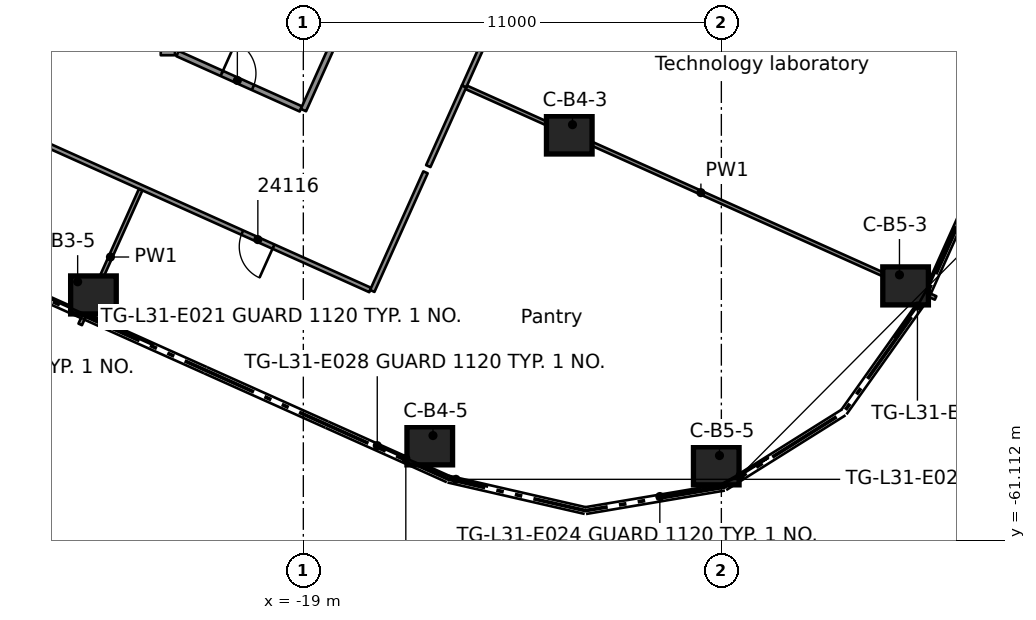
"""IFC4 building model, lengths in metres.
Left out: names, types, materials, properties, quantities, classifications, styles, units other than length and angle.
Written with IfcOpenShell. Run it as: python <this file> out.ifc"""

import sys

from ifc_helpers import new_model, si_unit, direction, frame, frame_2d, origin, origin_2d, place, context, subcontext, project, spatial, rectangle, extrude, element, fill, save


model = new_model("IFC4")
c1 = context("Model", 3, precision=1e-05, world=origin(), true_north=direction((0.0, 1.0)))
c2 = subcontext(c1, "Body", "Model", "MODEL_VIEW")
j1 = project(units=[si_unit("LENGTHUNIT", "METRE"), si_unit("PLANEANGLEUNIT", "RADIAN")], contexts=[c1])
p1 = place(None, origin())
s1 = spatial("IfcSite", under=j1, at=p1, CompositionType="ELEMENT")
p2 = place(p1, origin())
s2 = spatial("IfcBuilding", under=s1, at=p2, CompositionType="ELEMENT")
p3 = place(p2, frame((0.0, 0.0, 123.7)))
s3 = spatial("IfcBuildingStorey", under=s2, at=p3, CompositionType="ELEMENT", Elevation=123.7)
for number, where, z_axis, x_axis in (
    (1, (-24.523, -54.65, 0.0), (0.0, 0.0, 1.0), (1.0, 0.0, 0.0)),
    (2, (-12.002, -50.441, 0.0), (0.0, 0.0, 1.0), (1.0, 0.0, 0.0)),
    (3, (-15.673, -58.621, 0.0), (0.0, 0.0, 1.0), (1.0, 0.0, 0.0)),
    (4, (-3.152, -54.412, 0.0), (0.0, 0.0, 1.0), (1.0, 0.0, 0.0)),
    (5, (-8.134, -59.147, 0.0), (0.0, 0.0, 1.0), (1.0, 0.0, 0.0)),
):
    element("IfcColumn", number, at=place(p3, frame(where, z_axis=z_axis, x_axis=x_axis)), inside=s3, PredefinedType="COLUMN", context=c2, shape_type="SweptSolid", body=[
        extrude(rectangle(XDim=1.2, YDim=1.0, at=origin_2d()), origin(), (0.0, 0.0, 1.0), 3.5),
    ])
p4 = place(p3, frame((-17.239, -54.521, 0.0), z_axis=(0.0, 0.0, 1.0), x_axis=(-0.912380528424, 0.409343097355, 0.0)))
e6 = element("IfcWall", 6, at=p4, inside=s3, PredefinedType="PARTITIONING", context=c2, shape_type="SweptSolid", body=[
    extrude(rectangle(XDim=13.18, YDim=0.125, at=frame_2d((6.59, 0.0))), origin(), (0.0, 0.0, 1.0), 3.08),
])
p5 = place(p4, frame((2.792, 0.0, 0.0)))
e7 = element("IfcOpeningElement", 7, at=p5, cuts=e6, PredefinedType="OPENING", context=c2, shape_type="SweptSolid", body=[
    extrude(rectangle(XDim=0.9, YDim=2.1, at=frame_2d((0.45, 1.05))), frame((0.0, 0.073, 0.0), z_axis=(0.0, -1.0, 0.0), x_axis=(1.0, 0.0, 0.0)), (0.0, 0.0, 1.0), 0.145),
])
p6 = place(p3, frame((-22.31, -48.3, 0.0), z_axis=(0.0, 0.0, 1.0), x_axis=(0.912496069824, -0.409085470966, 0.0)))
e8 = element("IfcWall", 8, at=p6, inside=s3, PredefinedType="PARTITIONING", context=c2, shape_type="SweptSolid", body=[
    extrude(rectangle(XDim=3.556, YDim=0.15, at=frame_2d((1.778, 0.0))), origin(), (0.0, 0.0, 1.0), 3.08),
])
p7 = place(p6, frame((1.275, 0.0, 0.0)))
e9 = element("IfcOpeningElement", 9, at=p7, cuts=e8, PredefinedType="OPENING", context=c2, shape_type="SweptSolid", body=[
    extrude(rectangle(XDim=0.9, YDim=2.1, at=frame_2d((0.45, 1.05))), frame((0.0, 0.085, 0.0), z_axis=(0.0, -1.0, 0.0), x_axis=(1.0, 0.0, 0.0)), (0.0, 0.0, 1.0), 0.17),
])
p8 = place(p3, frame((-14.713, -49.188, 0.0), z_axis=(0.0, 0.0, 1.0), x_axis=(0.912374858899, -0.409355733865, 0.0)))
e10 = element("IfcWall", 10, at=p8, inside=s3, PredefinedType="PARTITIONING", context=c2, shape_type="SweptSolid", body=[
    extrude(rectangle(XDim=13.536, YDim=0.1, at=frame_2d((6.768, 0.0))), origin(), (0.0, 0.0, 1.0), 3.08),
])
p9 = place(p3, frame((-22.752, -48.268, 0.0), z_axis=(0.0, 0.0, 1.0), x_axis=(1.0, 0.0, 0.0)))
e11 = element("IfcWall", 11, at=p9, inside=s3, PredefinedType="PARTITIONING", context=c2, shape_type="SweptSolid", body=[
    extrude(rectangle(XDim=0.374, YDim=0.15, at=frame_2d((0.187, 0.0))), origin(), (0.0, 0.0, 1.0), 3.08),
])
p10 = place(p3, frame((-15.712, -51.26, 0.0), z_axis=(0.0, 0.0, 1.0), x_axis=(0.409583190249, 0.912272771854, 0.0)))
e12 = element("IfcWall", 12, at=p10, inside=s3, PredefinedType="PARTITIONING", context=c2, shape_type="SweptSolid", body=[
    extrude(rectangle(XDim=2.3, YDim=0.125, at=frame_2d((1.15, 0.0))), origin(), (0.0, 0.0, 1.0), 3.08),
])
p11 = place(p3, frame((-17.186, -54.545, 0.0), z_axis=(0.0, 0.0, 1.0), x_axis=(0.409572220998, 0.91227769664, 0.0)))
e13 = element("IfcWall", 13, at=p11, inside=s3, PredefinedType="PARTITIONING", context=c2, shape_type="SweptSolid", body=[
    extrude(rectangle(XDim=3.421, YDim=0.125, at=frame_2d((1.71, 0.0))), origin(), (0.0, 0.0, 1.0), 3.08),
])
p12 = place(p3, frame((-6.789, -31.374, 0.0), z_axis=(0.0, 0.0, 1.0), x_axis=(-0.409354309939, -0.912375497772, 0.0)))
e14 = element("IfcWall", 14, at=p12, inside=s3, PredefinedType="PARTITIONING", context=c2, shape_type="SweptSolid", body=[
    extrude(rectangle(XDim=19.496, YDim=0.125, at=frame_2d((9.748, 0.0))), origin(), (0.0, 0.0, 1.0), 3.08),
])
p13 = place(p12, frame((4.639, 0.0, 0.0)))
e15 = element("IfcOpeningElement", 15, at=p13, cuts=e14, PredefinedType="OPENING", context=c2, shape_type="SweptSolid", body=[
    extrude(rectangle(XDim=1.8, YDim=2.1, at=frame_2d((0.9, 1.05))), frame((0.0, 0.073, 0.0), z_axis=(0.0, -1.0, 0.0), x_axis=(1.0, 0.0, 0.0)), (0.0, 0.0, 1.0), 0.145),
])
p14 = place(p12, frame((14.697, 0.0, 0.0)))
e16 = element("IfcOpeningElement", 16, at=p14, cuts=e14, PredefinedType="OPENING", context=c2, shape_type="SweptSolid", body=[
    extrude(rectangle(XDim=0.9, YDim=2.1, at=frame_2d((0.45, 1.05))), frame((0.0, 0.073, 0.0), z_axis=(0.0, -1.0, 0.0), x_axis=(1.0, 0.0, 0.0)), (0.0, 0.0, 1.0), 0.145),
])
p15 = place(p3, frame((-18.997, -49.786, 0.0), z_axis=(0.0, 0.0, 1.0), x_axis=(0.409621859923, 0.912255409342, 0.0)))
e17 = element("IfcWall", 17, at=p15, inside=s3, PredefinedType="PARTITIONING", context=c2, shape_type="SweptSolid", body=[
    extrude(rectangle(XDim=21.091, YDim=0.15, at=frame_2d((10.545, 0.0))), origin(), (0.0, 0.0, 1.0), 3.08),
])
p16 = place(p15, frame((15.8, 0.0, 0.0)))
e18 = element("IfcOpeningElement", 18, at=p16, cuts=e17, PredefinedType="OPENING", context=c2, shape_type="SweptSolid", body=[
    extrude(rectangle(XDim=0.9, YDim=2.1, at=frame_2d((0.45, 1.05))), frame((0.0, 0.085, 0.0), z_axis=(0.0, -1.0, 0.0), x_axis=(1.0, 0.0, 0.0)), (0.0, 0.0, 1.0), 0.17),
])
p17 = place(p3, frame((-24.871, -55.425, 0.0), z_axis=(0.0, 0.0, 1.0), x_axis=(0.409358881384, 0.912373446694, 0.0)))
e19 = element("IfcWall", 19, at=p17, inside=s3, PredefinedType="PARTITIONING", context=c2, shape_type="SweptSolid", body=[
    extrude(rectangle(XDim=3.887, YDim=0.1, at=frame_2d((1.943, 0.0))), origin(), (0.0, 0.0, 1.0), 3.08),
])
p18 = place(p7, origin())
e20 = element("IfcDoor", 20, at=p18, inside=s3, OperationType="SINGLE_SWING_LEFT", PredefinedType="DOOR", context=c2, shape_type="SweptSolid", body=[
    extrude(rectangle(XDim=0.9, YDim=2.1, at=frame_2d((0.45, 1.05))), frame((0.0, 0.025, 0.0), z_axis=(0.0, -1.0, 0.0), x_axis=(1.0, 0.0, 0.0)), (0.0, 0.0, 1.0), 0.05),
])
fill(e9, e20)
p19 = place(p5, origin())
e21 = element("IfcDoor", 21, at=p19, inside=s3, OperationType="SINGLE_SWING_LEFT", PredefinedType="DOOR", context=c2, shape_type="SweptSolid", body=[
    extrude(rectangle(XDim=0.9, YDim=2.1, at=frame_2d((0.45, 1.05))), frame((0.0, 0.025, 0.0), z_axis=(0.0, -1.0, 0.0), x_axis=(1.0, 0.0, 0.0)), (0.0, 0.0, 1.0), 0.05),
])
fill(e7, e21)
save(model, sys.argv[1])
